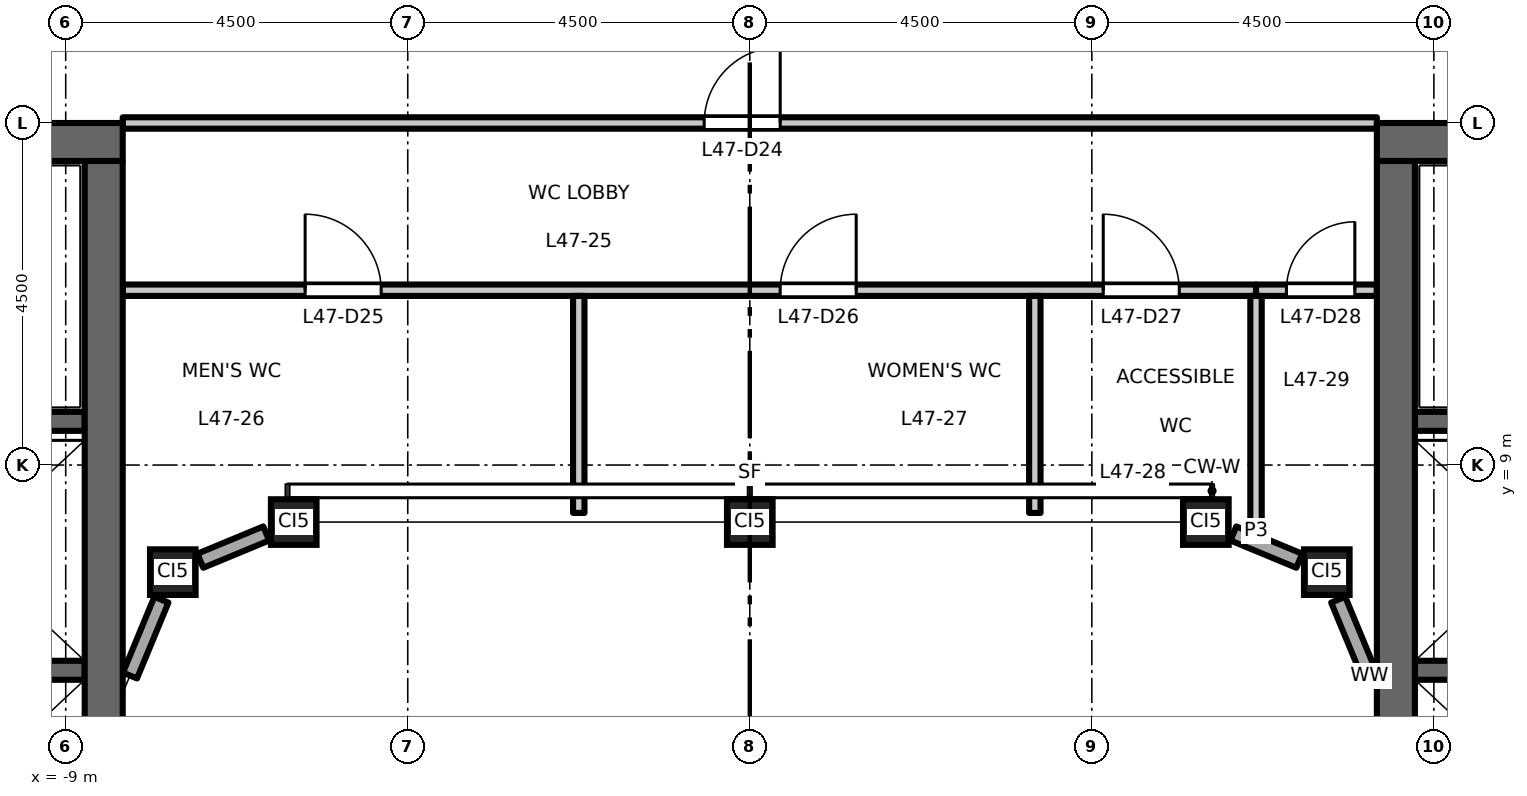
"""IFC4 building model, lengths in metres.
Left out: names, types, materials, properties, quantities, classifications, styles, units other than length and angle.
Written with IfcOpenShell. Run it as: python <this file> out.ifc"""

import sys

from ifc_helpers import new_model, si_unit, direction, frame, frame_2d, origin, origin_2d, place, context, subcontext, project, spatial, rectangle, hollow_rectangle, extrude, element, fill, save


model = new_model("IFC4")
c1 = context("Model", 3, precision=1e-05, world=origin(), true_north=direction((0.0, 1.0)))
c2 = subcontext(c1, "Body", "Model", "MODEL_VIEW")
j1 = project(units=[si_unit("LENGTHUNIT", "METRE"), si_unit("PLANEANGLEUNIT", "RADIAN")], contexts=[c1])
p1 = place(None, origin())
s1 = spatial("IfcSite", under=j1, at=p1, CompositionType="ELEMENT")
p2 = place(p1, origin())
s2 = spatial("IfcBuilding", under=s1, at=p2, CompositionType="ELEMENT")
p3 = place(p2, frame((0.0, 0.0, 219.7)))
s3 = spatial("IfcBuildingStorey", under=s2, at=p3, CompositionType="ELEMENT", Elevation=219.7)
for number, where, z_axis, x_axis in (
    (1, (-7.591, 7.591, 0.0), (0.0, 0.0, 1.0), (1.0, 0.0, 0.0)),
    (2, (-6.0, 8.25, 0.0), (0.0, 0.0, 1.0), (1.0, 0.0, 0.0)),
    (3, (0.0, 8.25, 0.0), (0.0, 0.0, 1.0), (1.0, 0.0, 0.0)),
    (4, (6.0, 8.25, 0.0), (0.0, 0.0, 1.0), (1.0, 0.0, 0.0)),
    (5, (7.591, 7.591, 0.0), (0.0, 0.0, 1.0), (1.0, 0.0, 0.0)),
):
    element("IfcColumn", number, at=place(p3, frame(where, z_axis=z_axis, x_axis=x_axis)), inside=s3, PredefinedType="COLUMN", context=c2, shape_type="SweptSolid", body=[
        extrude(hollow_rectangle(XDim=0.6, YDim=0.6, WallThickness=0.032, at=origin_2d()), origin(), (0.0, 0.0, 1.0), 4.5),
    ])
p4 = place(p3, frame((-8.75, 6.3, 0.0), z_axis=(0.0, 0.0, 1.0), x_axis=(-1.0, 0.0, 0.0)))
e6 = element("IfcWall", 6, at=p4, inside=s3, PredefinedType="SHEAR", context=c2, shape_type="SweptSolid", body=[
    extrude(rectangle(XDim=3.1, YDim=0.25, at=frame_2d((1.55, 0.0))), origin(), (0.0, 0.0, 1.0), 4.35),
])
p5 = place(p3, frame((-8.75, 9.575, 0.0), z_axis=(0.0, 0.0, 1.0), x_axis=(-1.0, 0.0, 0.0)))
e7 = element("IfcWall", 7, at=p5, inside=s3, PredefinedType="SHEAR", context=c2, shape_type="SweptSolid", body=[
    extrude(rectangle(XDim=8.0, YDim=0.25, at=frame_2d((4.0, 0.0))), origin(), (0.0, 0.0, 1.0), 4.35),
])
p6 = place(p5, frame((6.65, 0.0, 0.0)))
e8 = element("IfcOpeningElement", 8, at=p6, cuts=e7, PredefinedType="OPENING", context=c2, shape_type="SweptSolid", body=[
    extrude(rectangle(XDim=1.1, YDim=2.1, at=frame_2d((0.55, 1.05))), frame((0.0, 0.135, 0.0), z_axis=(0.0, -1.0, 0.0), x_axis=(1.0, 0.0, 0.0)), (0.0, 0.0, 1.0), 0.27),
])
p7 = place(p3, frame((-8.25, 13.25, 0.0), z_axis=(0.0, 0.0, 1.0), x_axis=(-1.0, 0.0, 0.0)))
e9 = element("IfcWall", 9, at=p7, inside=s3, PredefinedType="SHEAR", context=c2, shape_type="SweptSolid", body=[
    extrude(rectangle(XDim=13.5, YDim=0.5, at=frame_2d((6.75, 0.0))), origin(), (0.0, 0.0, 1.0), 4.35),
])
p8 = place(p3, frame((-8.5, -13.0, 0.0), z_axis=(0.0, 0.0, 1.0), x_axis=(0.0, 1.0, 0.0)))
e10 = element("IfcWall", 10, at=p8, inside=s3, PredefinedType="SHEAR", context=c2, shape_type="SweptSolid", body=[
    extrude(rectangle(XDim=26.0, YDim=0.5, at=frame_2d((13.0, 0.0))), origin(), (0.0, 0.0, 1.0), 4.35),
])
p9 = place(p3, frame((8.75, 6.3, 0.0), z_axis=(0.0, 0.0, 1.0), x_axis=(1.0, 0.0, 0.0)))
e11 = element("IfcWall", 11, at=p9, inside=s3, PredefinedType="SHEAR", context=c2, shape_type="SweptSolid", body=[
    extrude(rectangle(XDim=3.1, YDim=0.25, at=frame_2d((1.55, 0.0))), origin(), (0.0, 0.0, 1.0), 4.35),
])
p10 = place(p3, frame((8.75, 9.575, 0.0), z_axis=(0.0, 0.0, 1.0), x_axis=(1.0, 0.0, 0.0)))
e12 = element("IfcWall", 12, at=p10, inside=s3, PredefinedType="SHEAR", context=c2, shape_type="SweptSolid", body=[
    extrude(rectangle(XDim=8.0, YDim=0.25, at=frame_2d((4.0, 0.0))), origin(), (0.0, 0.0, 1.0), 4.35),
])
p11 = place(p10, frame((6.65, 0.0, 0.0)))
e13 = element("IfcOpeningElement", 13, at=p11, cuts=e12, PredefinedType="OPENING", context=c2, shape_type="SweptSolid", body=[
    extrude(rectangle(XDim=1.1, YDim=2.1, at=frame_2d((0.55, 1.05))), frame((0.0, 0.135, 0.0), z_axis=(0.0, -1.0, 0.0), x_axis=(1.0, 0.0, 0.0)), (0.0, 0.0, 1.0), 0.27),
])
p12 = place(p3, frame((8.25, 13.25, 0.0), z_axis=(0.0, 0.0, 1.0), x_axis=(1.0, 0.0, 0.0)))
e14 = element("IfcWall", 14, at=p12, inside=s3, PredefinedType="SHEAR", context=c2, shape_type="SweptSolid", body=[
    extrude(rectangle(XDim=13.5, YDim=0.5, at=frame_2d((6.75, 0.0))), origin(), (0.0, 0.0, 1.0), 4.35),
])
p13 = place(p3, frame((8.5, -13.0, 0.0), z_axis=(0.0, 0.0, 1.0), x_axis=(0.0, 1.0, 0.0)))
e15 = element("IfcWall", 15, at=p13, inside=s3, PredefinedType="SHEAR", context=c2, shape_type="SweptSolid", body=[
    extrude(rectangle(XDim=26.0, YDim=0.5, at=frame_2d((13.0, 0.0))), origin(), (0.0, 0.0, 1.0), 4.35),
])
p14 = place(p3, frame((8.154, 6.231, 0.0), z_axis=(0.0, 0.0, 1.0), x_axis=(-0.382704496366, 0.923870807235, 0.0)))
e16 = element("IfcWall", 16, at=p14, inside=s3, PredefinedType="STANDARD", context=c2, shape_type="SweptSolid", body=[
    extrude(rectangle(XDim=1.08, YDim=0.2, at=frame_2d((0.54, 0.0))), origin(), (0.0, 0.0, 1.0), 3.918),
])
for number, where, z_axis, x_axis in (
    (17, (7.229, 7.741, 0.0), (0.0, 0.0, 1.0), (-0.924, 0.383, 0.0)),
    (18, (-6.362, 8.1, 0.0), (0.0, 0.0, 1.0), (-0.924, -0.383, 0.0)),
):
    element("IfcWall", number, at=place(p3, frame(where, z_axis=z_axis, x_axis=x_axis)), inside=s3, PredefinedType="STANDARD", context=c2, shape_type="SweptSolid", body=[
        extrude(rectangle(XDim=0.938, YDim=0.2, at=frame_2d((0.469, 0.0))), origin(), (0.0, 0.0, 1.0), 3.918),
    ])
p15 = place(p3, frame((-7.741, 7.229, 0.0), z_axis=(0.0, 0.0, 1.0), x_axis=(-0.382704496366, -0.923870807235, 0.0)))
e19 = element("IfcWall", 19, at=p15, inside=s3, PredefinedType="STANDARD", context=c2, shape_type="SweptSolid", body=[
    extrude(rectangle(XDim=1.08, YDim=0.2, at=frame_2d((0.54, 0.0))), origin(), (0.0, 0.0, 1.0), 3.918),
])
p16 = place(p3, frame((-8.25, 11.3, 0.0), z_axis=(0.0, 0.0, 1.0), x_axis=(1.0, 0.0, 0.0)))
e20 = element("IfcWall", 20, at=p16, inside=s3, PredefinedType="PARTITIONING", context=c2, shape_type="SweptSolid", body=[
    extrude(rectangle(XDim=14.91, YDim=0.15, at=frame_2d((7.455, 0.0))), origin(), (0.0, 0.0, 1.0), 4.35),
])
p17 = place(p16, frame((2.4, 0.0, 0.0)))
e21 = element("IfcOpeningElement", 21, at=p17, cuts=e20, PredefinedType="OPENING", context=c2, shape_type="SweptSolid", body=[
    extrude(rectangle(XDim=1.0, YDim=2.1, at=frame_2d((0.5, 1.05))), frame((0.0, 0.085, 0.0), z_axis=(0.0, -1.0, 0.0), x_axis=(1.0, 0.0, 0.0)), (0.0, 0.0, 1.0), 0.17),
])
p18 = place(p16, frame((8.65, 0.0, 0.0)))
e22 = element("IfcOpeningElement", 22, at=p18, cuts=e20, PredefinedType="OPENING", context=c2, shape_type="SweptSolid", body=[
    extrude(rectangle(XDim=1.0, YDim=2.1, at=frame_2d((0.5, 1.05))), frame((0.0, 0.085, 0.0), z_axis=(0.0, -1.0, 0.0), x_axis=(1.0, 0.0, 0.0)), (0.0, 0.0, 1.0), 0.17),
])
p19 = place(p16, frame((12.9, 0.0, 0.0)))
e23 = element("IfcOpeningElement", 23, at=p19, cuts=e20, PredefinedType="OPENING", context=c2, shape_type="SweptSolid", body=[
    extrude(rectangle(XDim=1.0, YDim=2.1, at=frame_2d((0.5, 1.05))), frame((0.0, 0.085, 0.0), z_axis=(0.0, -1.0, 0.0), x_axis=(1.0, 0.0, 0.0)), (0.0, 0.0, 1.0), 0.17),
])
p20 = place(p3, frame((6.66, 11.3, 0.0), z_axis=(0.0, 0.0, 1.0), x_axis=(1.0, 0.0, 0.0)))
e24 = element("IfcWall", 24, at=p20, inside=s3, PredefinedType="PARTITIONING", context=c2, shape_type="SweptSolid", body=[
    extrude(rectangle(XDim=1.59, YDim=0.15, at=frame_2d((0.795, 0.0))), origin(), (0.0, 0.0, 1.0), 4.35),
])
p21 = place(p20, frame((0.4, 0.0, 0.0)))
e25 = element("IfcOpeningElement", 25, at=p21, cuts=e24, PredefinedType="OPENING", context=c2, shape_type="SweptSolid", body=[
    extrude(rectangle(XDim=0.9, YDim=2.1, at=frame_2d((0.45, 1.05))), frame((0.0, 0.085, 0.0), z_axis=(0.0, -1.0, 0.0), x_axis=(1.0, 0.0, 0.0)), (0.0, 0.0, 1.0), 0.17),
])
p22 = place(p3, frame((-8.25, 13.5, 0.0), z_axis=(0.0, 0.0, 1.0), x_axis=(1.0, 0.0, 0.0)))
e26 = element("IfcWall", 26, at=p22, inside=s3, PredefinedType="PARTITIONING", context=c2, shape_type="SweptSolid", body=[
    extrude(rectangle(XDim=16.5, YDim=0.15, at=frame_2d((8.25, 0.0))), origin(), (0.0, 0.0, 1.0), 4.35),
])
p23 = place(p22, frame((7.65, 0.0, 0.0)))
e27 = element("IfcOpeningElement", 27, at=p23, cuts=e26, PredefinedType="OPENING", context=c2, shape_type="SweptSolid", body=[
    extrude(rectangle(XDim=1.0, YDim=2.1, at=frame_2d((0.5, 1.05))), frame((0.0, 0.085, 0.0), z_axis=(0.0, -1.0, 0.0), x_axis=(1.0, 0.0, 0.0)), (0.0, 0.0, 1.0), 0.17),
])
for number, where, z_axis, x_axis in (
    (28, (-2.25, 8.37, 0.0), (0.0, 0.0, 1.0), (0.0, 1.0, 0.0)),
    (29, (3.75, 8.37, 0.0), (0.0, 0.0, 1.0), (0.0, 1.0, 0.0)),
):
    element("IfcWall", number, at=place(p3, frame(where, z_axis=z_axis, x_axis=x_axis)), inside=s3, PredefinedType="PARTITIONING", context=c2, shape_type="SweptSolid", body=[
        extrude(rectangle(XDim=2.855, YDim=0.15, at=frame_2d((1.427, 0.0))), origin(), (0.0, 0.0, 1.0), 4.35),
    ])
p24 = place(p3, frame((6.66, 8.127, 0.0), z_axis=(0.0, 0.0, 1.0), x_axis=(0.0, 1.0, 0.0)))
e30 = element("IfcWall", 30, at=p24, inside=s3, PredefinedType="PARTITIONING", context=c2, shape_type="SweptSolid", body=[
    extrude(rectangle(XDim=3.098, YDim=0.15, at=frame_2d((1.549, 0.0))), origin(), (0.0, 0.0, 1.0), 4.35),
])
p25 = place(p23, origin())
e31 = element("IfcDoor", 31, at=p25, inside=s3, OperationType="SINGLE_SWING_RIGHT", PredefinedType="DOOR", context=c2, shape_type="SweptSolid", body=[
    extrude(rectangle(XDim=1.0, YDim=2.1, at=frame_2d((0.5, 1.05))), frame((0.0, 0.025, 0.0), z_axis=(0.0, -1.0, 0.0), x_axis=(1.0, 0.0, 0.0)), (0.0, 0.0, 1.0), 0.05),
])
fill(e27, e31)
p26 = place(p17, origin())
e32 = element("IfcDoor", 32, at=p26, inside=s3, OperationType="SINGLE_SWING_LEFT", PredefinedType="DOOR", context=c2, shape_type="SweptSolid", body=[
    extrude(rectangle(XDim=1.0, YDim=2.1, at=frame_2d((0.5, 1.05))), frame((0.0, 0.025, 0.0), z_axis=(0.0, -1.0, 0.0), x_axis=(1.0, 0.0, 0.0)), (0.0, 0.0, 1.0), 0.05),
])
fill(e21, e32)
p27 = place(p18, origin())
e33 = element("IfcDoor", 33, at=p27, inside=s3, OperationType="SINGLE_SWING_RIGHT", PredefinedType="DOOR", context=c2, shape_type="SweptSolid", body=[
    extrude(rectangle(XDim=1.0, YDim=2.1, at=frame_2d((0.5, 1.05))), frame((0.0, 0.025, 0.0), z_axis=(0.0, -1.0, 0.0), x_axis=(1.0, 0.0, 0.0)), (0.0, 0.0, 1.0), 0.05),
])
fill(e22, e33)
p28 = place(p19, origin())
e34 = element("IfcDoor", 34, at=p28, inside=s3, OperationType="SINGLE_SWING_LEFT", PredefinedType="DOOR", context=c2, shape_type="SweptSolid", body=[
    extrude(rectangle(XDim=1.0, YDim=2.1, at=frame_2d((0.5, 1.05))), frame((0.0, 0.025, 0.0), z_axis=(0.0, -1.0, 0.0), x_axis=(1.0, 0.0, 0.0)), (0.0, 0.0, 1.0), 0.05),
])
fill(e23, e34)
p29 = place(p21, origin())
e35 = element("IfcDoor", 35, at=p29, inside=s3, OperationType="SINGLE_SWING_RIGHT", PredefinedType="DOOR", context=c2, shape_type="SweptSolid", body=[
    extrude(rectangle(XDim=0.9, YDim=2.1, at=frame_2d((0.45, 1.05))), frame((0.0, 0.025, 0.0), z_axis=(0.0, -1.0, 0.0), x_axis=(1.0, 0.0, 0.0)), (0.0, 0.0, 1.0), 0.05),
])
fill(e25, e35)
save(model, sys.argv[1])
